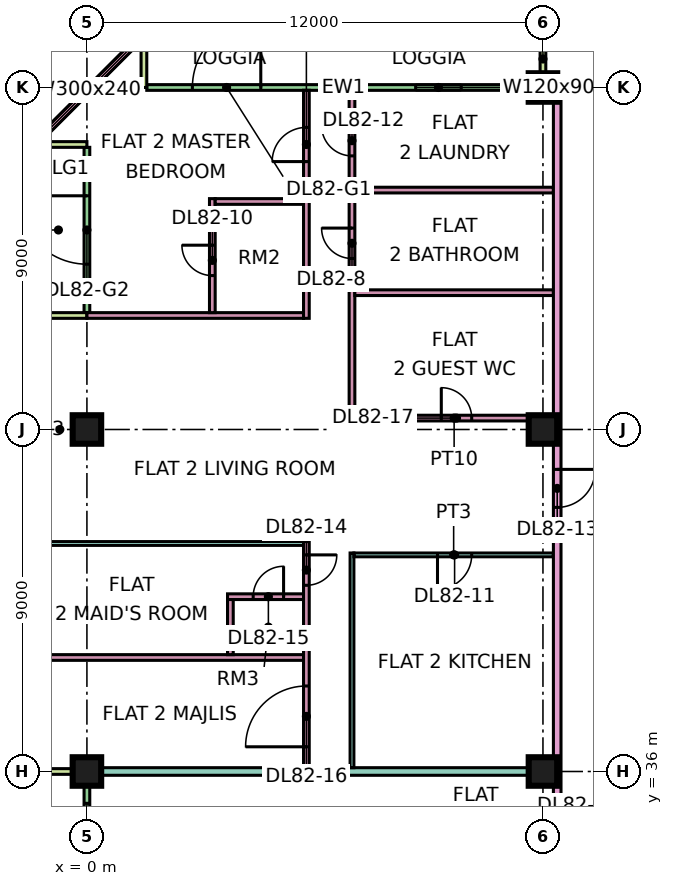
"""IFC4 building model, lengths in metres.
Left out: names, types, materials, properties, quantities, classifications, styles, units other than length and angle.
Written with IfcOpenShell. Run it as: python <this file> out.ifc"""

import sys

from ifc_helpers import new_model, si_unit, direction, frame, frame_2d, origin, origin_2d, place, context, subcontext, project, spatial, rectangle, extrude, element, fill, save


model = new_model("IFC4")
c1 = context("Model", 3, precision=1e-05, world=origin(), true_north=direction((0.0, 1.0)))
c2 = subcontext(c1, "Body", "Model", "MODEL_VIEW")
j1 = project(units=[si_unit("LENGTHUNIT", "METRE"), si_unit("PLANEANGLEUNIT", "RADIAN")], contexts=[c1])
p1 = place(None, origin())
s1 = spatial("IfcSite", under=j1, at=p1, CompositionType="ELEMENT")
p2 = place(p1, origin())
s2 = spatial("IfcBuilding", under=s1, at=p2, CompositionType="ELEMENT")
p3 = place(p2, frame((0.0, 0.0, 353.9)))
s3 = spatial("IfcBuildingStorey", under=s2, at=p3, CompositionType="ELEMENT", Elevation=353.9)
p4 = place(p3, frame((0.0, 36.0, 0.0), z_axis=(0.0, 0.0, 1.0), x_axis=(1.0, 0.0, 0.0)))
e1 = element("IfcColumn", 1, at=p4, inside=s3, PredefinedType="COLUMN", context=c2, shape_type="SweptSolid", body=[
    extrude(rectangle(XDim=0.75, YDim=0.75, at=origin_2d()), origin(), (0.0, 0.0, 1.0), 3.75),
])
for number, where, z_axis, x_axis in (
    (2, (0.0, 45.0, 0.0), (0.0, 0.0, 1.0), (1.0, 0.0, 0.0)),
    (3, (12.0, 36.0, 0.0), (0.0, 0.0, 1.0), (1.0, 0.0, 0.0)),
    (4, (12.0, 45.0, 0.0), (0.0, 0.0, 1.0), (1.0, 0.0, 0.0)),
    (5, (12.0, 54.0, 0.0), (0.0, 0.0, 1.0), (1.0, 0.0, 0.0)),
):
    element("IfcColumn", number, at=place(p3, frame(where, z_axis=z_axis, x_axis=x_axis)), inside=s3, PredefinedType="COLUMN", context=c2, shape_type="SweptSolid", body=[
        extrude(rectangle(XDim=0.75, YDim=0.75, at=origin_2d()), origin(), (0.0, 0.0, 1.0), 3.75),
    ])
p5 = place(p3, frame((11.925, 54.0, 0.0), z_axis=(0.0, 0.0, 1.0), x_axis=(-1.0, 0.0, 0.0)))
e6 = element("IfcWall", 6, at=p5, inside=s3, PredefinedType="SOLIDWALL", context=c2, shape_type="SweptSolid", body=[
    extrude(rectangle(XDim=10.35, YDim=0.15, at=frame_2d((5.175, 0.0))), origin(), (0.0, 0.0, 1.0), 3.35),
])
p6 = place(p5, frame((2.075, 0.0, 1.7)))
e7 = element("IfcOpeningElement", 7, at=p6, cuts=e6, PredefinedType="OPENING", context=c2, shape_type="SweptSolid", body=[
    extrude(rectangle(XDim=1.2, YDim=0.9, at=frame_2d((0.6, 0.45))), frame((0.0, 0.085, 0.0), z_axis=(0.0, -1.0, 0.0), x_axis=(1.0, 0.0, 0.0)), (0.0, 0.0, 1.0), 0.17),
])
p7 = place(p5, frame((7.35, 0.0, 0.0)))
e8 = element("IfcOpeningElement", 8, at=p7, cuts=e6, PredefinedType="OPENING", context=c2, shape_type="SweptSolid", body=[
    extrude(rectangle(XDim=1.8, YDim=2.4, at=frame_2d((0.9, 1.2))), frame((0.0, 0.085, 0.0), z_axis=(0.0, -1.0, 0.0), x_axis=(1.0, 0.0, 0.0)), (0.0, 0.0, 1.0), 0.17),
])
for number, where, z_axis, x_axis in (
    (9, (12.0, 55.5, 0.0), (0.0, 0.0, 1.0), (0.0, -1.0, 0.0)),
    (10, (1.5, 55.5, 0.0), (0.0, 0.0, 1.0), (0.0, -1.0, 0.0)),
):
    element("IfcWall", number, at=place(p3, frame(where, z_axis=z_axis, x_axis=x_axis)), inside=s3, PredefinedType="SOLIDWALL", context=c2, shape_type="SweptSolid", body=[
        extrude(rectangle(XDim=1.5, YDim=0.15, at=frame_2d((0.75, 0.0))), origin(), (0.0, 0.0, 1.0), 3.35),
    ])
p8 = place(p3, frame((1.553, 55.447, 0.0), z_axis=(0.0, 0.0, 1.0), x_axis=(-0.707106781187, -0.707106781187, 0.0)))
e11 = element("IfcWall", 11, at=p8, inside=s3, PredefinedType="SOLIDWALL", context=c2, shape_type="SweptSolid", body=[
    extrude(rectangle(XDim=4.243, YDim=0.15, at=frame_2d((2.121, 0.0))), origin(), (0.0, 0.0, 1.0), 3.35),
])
p9 = place(p8, frame((0.621, 0.0, 0.45)))
e12 = element("IfcOpeningElement", 12, at=p9, cuts=e11, PredefinedType="OPENING", context=c2, shape_type="SweptSolid", body=[
    extrude(rectangle(XDim=3.0, YDim=2.4, at=frame_2d((1.5, 1.2))), frame((0.0, 0.085, 0.0), z_axis=(0.0, -1.0, 0.0), x_axis=(1.0, 0.0, 0.0)), (0.0, 0.0, 1.0), 0.17),
])
p10 = place(p3, frame((0.0, 52.425, 0.0), z_axis=(0.0, 0.0, 1.0), x_axis=(0.0, -1.0, 0.0)))
e13 = element("IfcWall", 13, at=p10, inside=s3, PredefinedType="SOLIDWALL", context=c2, shape_type="SweptSolid", body=[
    extrude(rectangle(XDim=4.35, YDim=0.15, at=frame_2d((2.175, 0.0))), origin(), (0.0, 0.0, 1.0), 3.35),
])
p11 = place(p10, frame((1.275, 0.0, 0.0)))
e14 = element("IfcOpeningElement", 14, at=p11, cuts=e13, PredefinedType="OPENING", context=c2, shape_type="SweptSolid", body=[
    extrude(rectangle(XDim=1.8, YDim=2.4, at=frame_2d((0.9, 1.2))), frame((0.0, 0.085, 0.0), z_axis=(0.0, -1.0, 0.0), x_axis=(1.0, 0.0, 0.0)), (0.0, 0.0, 1.0), 0.17),
])
for number, where, z_axis, x_axis in (
    (15, (-1.5, 52.5, 0.0), (0.0, 0.0, 1.0), (1.0, 0.0, 0.0)),
    (16, (-1.5, 48.0, 0.0), (0.0, 0.0, 1.0), (1.0, 0.0, 0.0)),
):
    element("IfcWall", number, at=place(p3, frame(where, z_axis=z_axis, x_axis=x_axis)), inside=s3, PredefinedType="SOLIDWALL", context=c2, shape_type="SweptSolid", body=[
        extrude(rectangle(XDim=1.5, YDim=0.15, at=frame_2d((0.75, 0.0))), origin(), (0.0, 0.0, 1.0), 3.35),
    ])
p12 = place(p3, frame((0.0, 35.925, 0.0), z_axis=(0.0, 0.0, 1.0), x_axis=(0.0, -1.0, 0.0)))
e17 = element("IfcWall", 17, at=p12, inside=s3, PredefinedType="SOLIDWALL", context=c2, shape_type="SweptSolid", body=[
    extrude(rectangle(XDim=11.85, YDim=0.15, at=frame_2d((5.925, 0.0))), origin(), (0.0, 0.0, 1.0), 3.35),
])
p13 = place(p12, frame((0.762, 0.0, 0.45)))
e18 = element("IfcOpeningElement", 18, at=p13, cuts=e17, PredefinedType="OPENING", context=c2, shape_type="SweptSolid", body=[
    extrude(rectangle(XDim=1.8, YDim=2.4, at=frame_2d((0.9, 1.2))), frame((0.0, 0.085, 0.0), z_axis=(0.0, -1.0, 0.0), x_axis=(1.0, 0.0, 0.0)), (0.0, 0.0, 1.0), 0.17),
])
p14 = place(p12, frame((5.025, 0.0, 0.0)))
e19 = element("IfcOpeningElement", 19, at=p14, cuts=e17, PredefinedType="OPENING", context=c2, shape_type="SweptSolid", body=[
    extrude(rectangle(XDim=1.8, YDim=2.4, at=frame_2d((0.9, 1.2))), frame((0.0, 0.085, 0.0), z_axis=(0.0, -1.0, 0.0), x_axis=(1.0, 0.0, 0.0)), (0.0, 0.0, 1.0), 0.17),
])
p15 = place(p12, frame((9.288, 0.0, 0.45)))
e20 = element("IfcOpeningElement", 20, at=p15, cuts=e17, PredefinedType="OPENING", context=c2, shape_type="SweptSolid", body=[
    extrude(rectangle(XDim=1.8, YDim=2.4, at=frame_2d((0.9, 1.2))), frame((0.0, 0.085, 0.0), z_axis=(0.0, -1.0, 0.0), x_axis=(1.0, 0.0, 0.0)), (0.0, 0.0, 1.0), 0.17),
])
p16 = place(p3, frame((-1.5, 36.0, 0.0), z_axis=(0.0, 0.0, 1.0), x_axis=(1.0, 0.0, 0.0)))
e21 = element("IfcWall", 21, at=p16, inside=s3, PredefinedType="SOLIDWALL", context=c2, shape_type="SweptSolid", body=[
    extrude(rectangle(XDim=1.5, YDim=0.15, at=frame_2d((0.75, 0.0))), origin(), (0.0, 0.0, 1.0), 3.35),
])
p17 = place(p3, frame((-1.351, 39.0, 0.0), z_axis=(0.0, 0.0, 1.0), x_axis=(1.0, 0.0, 0.0)))
e22 = element("IfcWall", 22, at=p17, inside=s3, PredefinedType="PARTITIONING", context=c2, shape_type="SweptSolid", body=[
    extrude(rectangle(XDim=7.051, YDim=0.15, at=frame_2d((3.525, 0.0))), origin(), (0.0, 0.0, 1.0), 3.35),
])
e23 = element("IfcWall", 23, at=p4, inside=s3, PredefinedType="PARTITIONING", context=c2, shape_type="SweptSolid", body=[
    extrude(rectangle(XDim=12.275, YDim=0.2, at=frame_2d((6.137, 0.0))), origin(), (0.0, 0.0, 1.0), 3.35),
])
p18 = place(p3, frame((-1.35, 42.0, 0.0), z_axis=(0.0, 0.0, 1.0), x_axis=(1.0, 0.0, 0.0)))
e24 = element("IfcWall", 24, at=p18, inside=s3, PredefinedType="PARTITIONING", context=c2, shape_type="SweptSolid", body=[
    extrude(rectangle(XDim=7.05, YDim=0.1, at=frame_2d((3.525, 0.0))), origin(), (0.0, 0.0, 1.0), 3.35),
])
p19 = place(p3, frame((0.0, 48.0, 0.0), z_axis=(0.0, 0.0, 1.0), x_axis=(1.0, 0.0, 0.0)))
e25 = element("IfcWall", 25, at=p19, inside=s3, PredefinedType="PARTITIONING", context=c2, shape_type="SweptSolid", body=[
    extrude(rectangle(XDim=5.7, YDim=0.15, at=frame_2d((2.85, 0.0))), origin(), (0.0, 0.0, 1.0), 3.35),
])
p20 = place(p3, frame((3.3, 48.075, 0.0), z_axis=(0.0, 0.0, 1.0), x_axis=(0.0, 1.0, 0.0)))
e26 = element("IfcWall", 26, at=p20, inside=s3, PredefinedType="PARTITIONING", context=c2, shape_type="SweptSolid", body=[
    extrude(rectangle(XDim=3.0, YDim=0.15, at=frame_2d((1.5, 0.0))), origin(), (0.0, 0.0, 1.0), 3.35),
])
p21 = place(p20, frame((0.975, 0.0, 0.0)))
e27 = element("IfcOpeningElement", 27, at=p21, cuts=e26, PredefinedType="OPENING", context=c2, shape_type="SweptSolid", body=[
    extrude(rectangle(XDim=0.8, YDim=2.1, at=frame_2d((0.4, 1.05))), frame((0.0, 0.085, 0.0), z_axis=(0.0, -1.0, 0.0), x_axis=(1.0, 0.0, 0.0)), (0.0, 0.0, 1.0), 0.17),
])
p22 = place(p3, frame((3.375, 51.0, 0.0), z_axis=(0.0, 0.0, 1.0), x_axis=(1.0, 0.0, 0.0)))
e28 = element("IfcWall", 28, at=p22, inside=s3, PredefinedType="PARTITIONING", context=c2, shape_type="SweptSolid", body=[
    extrude(rectangle(XDim=2.325, YDim=0.15, at=frame_2d((1.163, 0.0))), origin(), (0.0, 0.0, 1.0), 3.35),
])
p23 = place(p3, frame((3.7, 40.6, 0.0), z_axis=(0.0, 0.0, 1.0), x_axis=(1.0, 0.0, 0.0)))
e29 = element("IfcWall", 29, at=p23, inside=s3, PredefinedType="PARTITIONING", context=c2, shape_type="SweptSolid", body=[
    extrude(rectangle(XDim=2.0, YDim=0.15, at=frame_2d((1.0, 0.0))), origin(), (0.0, 0.0, 1.0), 3.35),
])
p24 = place(p23, frame((0.675, 0.0, 0.0)))
e30 = element("IfcOpeningElement", 30, at=p24, cuts=e29, PredefinedType="OPENING", context=c2, shape_type="SweptSolid", body=[
    extrude(rectangle(XDim=0.8, YDim=2.1, at=frame_2d((0.4, 1.05))), frame((0.0, 0.085, 0.0), z_axis=(0.0, -1.0, 0.0), x_axis=(1.0, 0.0, 0.0)), (0.0, 0.0, 1.0), 0.17),
])
p25 = place(p3, frame((3.775, 39.075, 0.0), z_axis=(0.0, 0.0, 1.0), x_axis=(0.0, 1.0, 0.0)))
e31 = element("IfcWall", 31, at=p25, inside=s3, PredefinedType="PARTITIONING", context=c2, shape_type="SweptSolid", body=[
    extrude(rectangle(XDim=1.45, YDim=0.15, at=frame_2d((0.725, 0.0))), origin(), (0.0, 0.0, 1.0), 3.35),
])
p26 = place(p3, frame((5.775, 36.1, 0.0), z_axis=(0.0, 0.0, 1.0), x_axis=(0.0, 1.0, 0.0)))
e32 = element("IfcWall", 32, at=p26, inside=s3, PredefinedType="PARTITIONING", context=c2, shape_type="SweptSolid", body=[
    extrude(rectangle(XDim=5.95, YDim=0.15, at=frame_2d((2.975, 0.0))), origin(), (0.0, 0.0, 1.0), 3.35),
])
p27 = place(p26, frame((4.8, 0.0, 0.0)))
e33 = element("IfcOpeningElement", 33, at=p27, cuts=e32, PredefinedType="OPENING", context=c2, shape_type="SweptSolid", body=[
    extrude(rectangle(XDim=0.8, YDim=2.1, at=frame_2d((0.4, 1.05))), frame((0.0, 0.085, 0.0), z_axis=(0.0, -1.0, 0.0), x_axis=(1.0, 0.0, 0.0)), (0.0, 0.0, 1.0), 0.17),
])
p28 = place(p26, frame((0.55, 0.0, 0.0)))
e34 = element("IfcOpeningElement", 34, at=p28, cuts=e32, PredefinedType="OPENING", context=c2, shape_type="SweptSolid", body=[
    extrude(rectangle(XDim=1.6, YDim=2.1, at=frame_2d((0.8, 1.05))), frame((0.0, 0.085, 0.0), z_axis=(0.0, -1.0, 0.0), x_axis=(1.0, 0.0, 0.0)), (0.0, 0.0, 1.0), 0.17),
])
p29 = place(p3, frame((5.775, 47.925, 0.0), z_axis=(0.0, 0.0, 1.0), x_axis=(0.0, 1.0, 0.0)))
e35 = element("IfcWall", 35, at=p29, inside=s3, PredefinedType="PARTITIONING", context=c2, shape_type="SweptSolid", body=[
    extrude(rectangle(XDim=6.001, YDim=0.15, at=frame_2d((3.0, 0.0))), origin(), (0.0, 0.0, 1.0), 3.35),
])
p30 = place(p29, frame((4.125, 0.0, 0.0)))
e36 = element("IfcOpeningElement", 36, at=p30, cuts=e35, PredefinedType="OPENING", context=c2, shape_type="SweptSolid", body=[
    extrude(rectangle(XDim=0.9, YDim=2.1, at=frame_2d((0.45, 1.05))), frame((0.0, 0.085, 0.0), z_axis=(0.0, -1.0, 0.0), x_axis=(1.0, 0.0, 0.0)), (0.0, 0.0, 1.0), 0.17),
])
p31 = place(p3, frame((6.975, 36.1, 0.0), z_axis=(0.0, 0.0, 1.0), x_axis=(0.0, 1.0, 0.0)))
e37 = element("IfcWall", 37, at=p31, inside=s3, PredefinedType="PARTITIONING", context=c2, shape_type="SweptSolid", body=[
    extrude(rectangle(XDim=5.65, YDim=0.1, at=frame_2d((2.825, 0.0))), origin(), (0.0, 0.0, 1.0), 3.35),
])
p32 = place(p3, frame((6.975, 45.225, 0.0), z_axis=(0.0, 0.0, 1.0), x_axis=(0.0, 1.0, 0.0)))
e38 = element("IfcWall", 38, at=p32, inside=s3, PredefinedType="PARTITIONING", context=c2, shape_type="SweptSolid", body=[
    extrude(rectangle(XDim=8.701, YDim=0.15, at=frame_2d((4.351, 0.0))), origin(), (0.0, 0.0, 1.0), 3.35),
])
p33 = place(p32, frame((4.275, 0.0, 0.0)))
e39 = element("IfcOpeningElement", 39, at=p33, cuts=e38, PredefinedType="OPENING", context=c2, shape_type="SweptSolid", body=[
    extrude(rectangle(XDim=0.8, YDim=2.1, at=frame_2d((0.4, 1.05))), frame((0.0, 0.085, 0.0), z_axis=(0.0, -1.0, 0.0), x_axis=(1.0, 0.0, 0.0)), (0.0, 0.0, 1.0), 0.17),
])
p34 = place(p32, frame((6.975, 0.0, 0.0)))
e40 = element("IfcOpeningElement", 40, at=p34, cuts=e38, PredefinedType="OPENING", context=c2, shape_type="SweptSolid", body=[
    extrude(rectangle(XDim=0.8, YDim=2.1, at=frame_2d((0.4, 1.05))), frame((0.0, 0.085, 0.0), z_axis=(0.0, -1.0, 0.0), x_axis=(1.0, 0.0, 0.0)), (0.0, 0.0, 1.0), 0.17),
])
p35 = place(p3, frame((7.025, 41.7, 0.0), z_axis=(0.0, 0.0, 1.0), x_axis=(1.0, 0.0, 0.0)))
e41 = element("IfcWall", 41, at=p35, inside=s3, PredefinedType="PARTITIONING", context=c2, shape_type="SweptSolid", body=[
    extrude(rectangle(XDim=5.25, YDim=0.1, at=frame_2d((2.625, 0.0))), origin(), (0.0, 0.0, 1.0), 3.35),
])
p36 = place(p35, frame((2.2, 0.0, 0.0)))
e42 = element("IfcOpeningElement", 42, at=p36, cuts=e41, PredefinedType="OPENING", context=c2, shape_type="SweptSolid", body=[
    extrude(rectangle(XDim=0.9, YDim=2.1, at=frame_2d((0.45, 1.05))), frame((0.0, 0.06, 0.0), z_axis=(0.0, -1.0, 0.0), x_axis=(1.0, 0.0, 0.0)), (0.0, 0.0, 1.0), 0.12),
])
p37 = place(p3, frame((7.05, 45.3, 0.0), z_axis=(0.0, 0.0, 1.0), x_axis=(1.0, 0.0, 0.0)))
e43 = element("IfcWall", 43, at=p37, inside=s3, PredefinedType="PARTITIONING", context=c2, shape_type="SweptSolid", body=[
    extrude(rectangle(XDim=5.225, YDim=0.15, at=frame_2d((2.612, 0.0))), origin(), (0.0, 0.0, 1.0), 3.35),
])
p38 = place(p37, frame((2.275, 0.0, 0.0)))
e44 = element("IfcOpeningElement", 44, at=p38, cuts=e43, PredefinedType="OPENING", context=c2, shape_type="SweptSolid", body=[
    extrude(rectangle(XDim=0.8, YDim=2.1, at=frame_2d((0.4, 1.05))), frame((0.0, 0.085, 0.0), z_axis=(0.0, -1.0, 0.0), x_axis=(1.0, 0.0, 0.0)), (0.0, 0.0, 1.0), 0.17),
])
for number, where, z_axis, x_axis in (
    (45, (7.05, 48.6, 0.0), (0.0, 0.0, 1.0), (1.0, 0.0, 0.0)),
    (46, (7.05, 51.3, 0.0), (0.0, 0.0, 1.0), (1.0, 0.0, 0.0)),
):
    element("IfcWall", number, at=place(p3, frame(where, z_axis=z_axis, x_axis=x_axis)), inside=s3, PredefinedType="PARTITIONING", context=c2, shape_type="SweptSolid", body=[
        extrude(rectangle(XDim=5.225, YDim=0.15, at=frame_2d((2.612, 0.0))), origin(), (0.0, 0.0, 1.0), 3.35),
    ])
p39 = place(p3, frame((12.375, 20.0, 0.0), z_axis=(0.0, 0.0, 1.0), x_axis=(0.0, 1.0, 0.0)))
e47 = element("IfcWall", 47, at=p39, inside=s3, PredefinedType="PARTITIONING", context=c2, shape_type="SweptSolid", body=[
    extrude(rectangle(XDim=34.0, YDim=0.2, at=frame_2d((17.0, 0.0))), origin(), (0.0, 0.0, 1.0), 3.35),
])
p40 = place(p39, frame((22.95, 0.0, 0.0)))
e48 = element("IfcOpeningElement", 48, at=p40, cuts=e47, PredefinedType="OPENING", context=c2, shape_type="SweptSolid", body=[
    extrude(rectangle(XDim=1.0, YDim=2.1, at=frame_2d((0.5, 1.05))), frame((0.0, 0.11, 0.0), z_axis=(0.0, -1.0, 0.0), x_axis=(1.0, 0.0, 0.0)), (0.0, 0.0, 1.0), 0.22),
])
p41 = place(p39, frame((0.6, 0.0, 0.0)))
e49 = element("IfcOpeningElement", 49, at=p41, cuts=e47, PredefinedType="OPENING", context=c2, shape_type="SweptSolid", body=[
    extrude(rectangle(XDim=1.2, YDim=2.1, at=frame_2d((0.6, 1.05))), frame((0.0, 0.11, 0.0), z_axis=(0.0, -1.0, 0.0), x_axis=(1.0, 0.0, 0.0)), (0.0, 0.0, 1.0), 0.22),
])
p42 = place(p39, frame((13.65, 0.0, 0.0)))
e50 = element("IfcOpeningElement", 50, at=p42, cuts=e47, PredefinedType="OPENING", context=c2, shape_type="SweptSolid", body=[
    extrude(rectangle(XDim=1.0, YDim=2.1, at=frame_2d((0.5, 1.05))), frame((0.0, 0.11, 0.0), z_axis=(0.0, -1.0, 0.0), x_axis=(1.0, 0.0, 0.0)), (0.0, 0.0, 1.0), 0.22),
])
p43 = place(p6, origin())
e51 = element("IfcWindow", 51, at=p43, inside=s3, PartitioningType="SINGLE_PANEL", PredefinedType="WINDOW", context=c2, shape_type="SweptSolid", body=[
    extrude(rectangle(XDim=1.2, YDim=0.9, at=frame_2d((0.6, 0.45))), frame((0.0, 0.03, 0.0), z_axis=(0.0, -1.0, 0.0), x_axis=(1.0, 0.0, 0.0)), (0.0, 0.0, 1.0), 0.06),
])
fill(e7, e51)
p44 = place(p7, frame((1.8, 0.0, 0.0), z_axis=(0.0, 0.0, 1.0), x_axis=(-1.0, 0.0, 0.0)))
e52 = element("IfcDoor", 52, at=p44, inside=s3, OperationType="DOUBLE_DOOR_SINGLE_SWING", PredefinedType="DOOR", context=c2, shape_type="SweptSolid", body=[
    extrude(rectangle(XDim=1.8, YDim=2.4, at=frame_2d((0.9, 1.2))), frame((0.0, 0.025, 0.0), z_axis=(0.0, -1.0, 0.0), x_axis=(1.0, 0.0, 0.0)), (0.0, 0.0, 1.0), 0.05),
])
fill(e8, e52)
p45 = place(p9, origin())
e53 = element("IfcWindow", 53, at=p45, inside=s3, PartitioningType="SINGLE_PANEL", PredefinedType="WINDOW", context=c2, shape_type="SweptSolid", body=[
    extrude(rectangle(XDim=3.0, YDim=2.4, at=frame_2d((1.5, 1.2))), frame((0.0, 0.03, 0.0), z_axis=(0.0, -1.0, 0.0), x_axis=(1.0, 0.0, 0.0)), (0.0, 0.0, 1.0), 0.06),
])
fill(e12, e53)
p46 = place(p11, frame((1.8, 0.0, 0.0), z_axis=(0.0, 0.0, 1.0), x_axis=(-1.0, 0.0, 0.0)))
e54 = element("IfcDoor", 54, at=p46, inside=s3, OperationType="DOUBLE_DOOR_SINGLE_SWING", PredefinedType="DOOR", context=c2, shape_type="SweptSolid", body=[
    extrude(rectangle(XDim=1.8, YDim=2.4, at=frame_2d((0.9, 1.2))), frame((0.0, 0.025, 0.0), z_axis=(0.0, -1.0, 0.0), x_axis=(1.0, 0.0, 0.0)), (0.0, 0.0, 1.0), 0.05),
])
fill(e14, e54)
p47 = place(p13, origin())
e55 = element("IfcWindow", 55, at=p47, inside=s3, PartitioningType="SINGLE_PANEL", PredefinedType="WINDOW", context=c2, shape_type="SweptSolid", body=[
    extrude(rectangle(XDim=1.8, YDim=2.4, at=frame_2d((0.9, 1.2))), frame((0.0, 0.03, 0.0), z_axis=(0.0, -1.0, 0.0), x_axis=(1.0, 0.0, 0.0)), (0.0, 0.0, 1.0), 0.06),
])
fill(e18, e55)
p48 = place(p33, frame((0.8, 0.0, 0.0), z_axis=(0.0, 0.0, 1.0), x_axis=(-1.0, 0.0, 0.0)))
e56 = element("IfcDoor", 56, at=p48, inside=s3, OperationType="SINGLE_SWING_RIGHT", PredefinedType="DOOR", context=c2, shape_type="SweptSolid", body=[
    extrude(rectangle(XDim=0.8, YDim=2.1, at=frame_2d((0.4, 1.05))), frame((0.0, 0.025, 0.0), z_axis=(0.0, -1.0, 0.0), x_axis=(1.0, 0.0, 0.0)), (0.0, 0.0, 1.0), 0.05),
])
fill(e39, e56)
p49 = place(p30, origin())
e57 = element("IfcDoor", 57, at=p49, inside=s3, OperationType="SINGLE_SWING_LEFT", PredefinedType="DOOR", context=c2, shape_type="SweptSolid", body=[
    extrude(rectangle(XDim=0.9, YDim=2.1, at=frame_2d((0.45, 1.05))), frame((0.0, 0.025, 0.0), z_axis=(0.0, -1.0, 0.0), x_axis=(1.0, 0.0, 0.0)), (0.0, 0.0, 1.0), 0.05),
])
fill(e36, e57)
p50 = place(p21, frame((0.8, 0.0, 0.0), z_axis=(0.0, 0.0, 1.0), x_axis=(-1.0, 0.0, 0.0)))
e58 = element("IfcDoor", 58, at=p50, inside=s3, OperationType="SINGLE_SWING_RIGHT", PredefinedType="DOOR", context=c2, shape_type="SweptSolid", body=[
    extrude(rectangle(XDim=0.8, YDim=2.1, at=frame_2d((0.4, 1.05))), frame((0.0, 0.025, 0.0), z_axis=(0.0, -1.0, 0.0), x_axis=(1.0, 0.0, 0.0)), (0.0, 0.0, 1.0), 0.05),
])
fill(e27, e58)
p51 = place(p36, frame((0.9, 0.0, 0.0), z_axis=(0.0, 0.0, 1.0), x_axis=(-1.0, 0.0, 0.0)))
e59 = element("IfcDoor", 59, at=p51, inside=s3, OperationType="SINGLE_SWING_LEFT", PredefinedType="DOOR", context=c2, shape_type="SweptSolid", body=[
    extrude(rectangle(XDim=0.9, YDim=2.1, at=frame_2d((0.45, 1.05))), frame((0.0, 0.025, 0.0), z_axis=(0.0, -1.0, 0.0), x_axis=(1.0, 0.0, 0.0)), (0.0, 0.0, 1.0), 0.05),
])
fill(e42, e59)
p52 = place(p34, frame((0.8, 0.0, 0.0), z_axis=(0.0, 0.0, 1.0), x_axis=(-1.0, 0.0, 0.0)))
e60 = element("IfcDoor", 60, at=p52, inside=s3, OperationType="SINGLE_SWING_RIGHT", PredefinedType="DOOR", context=c2, shape_type="SweptSolid", body=[
    extrude(rectangle(XDim=0.8, YDim=2.1, at=frame_2d((0.4, 1.05))), frame((0.0, 0.025, 0.0), z_axis=(0.0, -1.0, 0.0), x_axis=(1.0, 0.0, 0.0)), (0.0, 0.0, 1.0), 0.05),
])
fill(e40, e60)
p53 = place(p40, origin())
e61 = element("IfcDoor", 61, at=p53, inside=s3, OperationType="SINGLE_SWING_RIGHT", PredefinedType="DOOR", context=c2, shape_type="SweptSolid", body=[
    extrude(rectangle(XDim=1.0, YDim=2.1, at=frame_2d((0.5, 1.05))), frame((0.0, 0.025, 0.0), z_axis=(0.0, -1.0, 0.0), x_axis=(1.0, 0.0, 0.0)), (0.0, 0.0, 1.0), 0.05),
])
fill(e48, e61)
p54 = place(p27, origin())
e62 = element("IfcDoor", 62, at=p54, inside=s3, OperationType="SINGLE_SWING_RIGHT", PredefinedType="DOOR", context=c2, shape_type="SweptSolid", body=[
    extrude(rectangle(XDim=0.8, YDim=2.1, at=frame_2d((0.4, 1.05))), frame((0.0, 0.025, 0.0), z_axis=(0.0, -1.0, 0.0), x_axis=(1.0, 0.0, 0.0)), (0.0, 0.0, 1.0), 0.05),
])
fill(e33, e62)
p55 = place(p24, frame((0.8, 0.0, 0.0), z_axis=(0.0, 0.0, 1.0), x_axis=(-1.0, 0.0, 0.0)))
e63 = element("IfcDoor", 63, at=p55, inside=s3, OperationType="SINGLE_SWING_RIGHT", PredefinedType="DOOR", context=c2, shape_type="SweptSolid", body=[
    extrude(rectangle(XDim=0.8, YDim=2.1, at=frame_2d((0.4, 1.05))), frame((0.0, 0.025, 0.0), z_axis=(0.0, -1.0, 0.0), x_axis=(1.0, 0.0, 0.0)), (0.0, 0.0, 1.0), 0.05),
])
fill(e30, e63)
p56 = place(p28, origin())
e64 = element("IfcDoor", 64, at=p56, inside=s3, OperationType="DOUBLE_DOOR_SINGLE_SWING", PredefinedType="DOOR", context=c2, shape_type="SweptSolid", body=[
    extrude(rectangle(XDim=1.6, YDim=2.1, at=frame_2d((0.8, 1.05))), frame((0.0, 0.025, 0.0), z_axis=(0.0, -1.0, 0.0), x_axis=(1.0, 0.0, 0.0)), (0.0, 0.0, 1.0), 0.05),
])
fill(e34, e64)
p57 = place(p38, origin())
e65 = element("IfcDoor", 65, at=p57, inside=s3, OperationType="SINGLE_SWING_LEFT", PredefinedType="DOOR", context=c2, shape_type="SweptSolid", body=[
    extrude(rectangle(XDim=0.8, YDim=2.1, at=frame_2d((0.4, 1.05))), frame((0.0, 0.025, 0.0), z_axis=(0.0, -1.0, 0.0), x_axis=(1.0, 0.0, 0.0)), (0.0, 0.0, 1.0), 0.05),
])
fill(e44, e65)
save(model, sys.argv[1])
